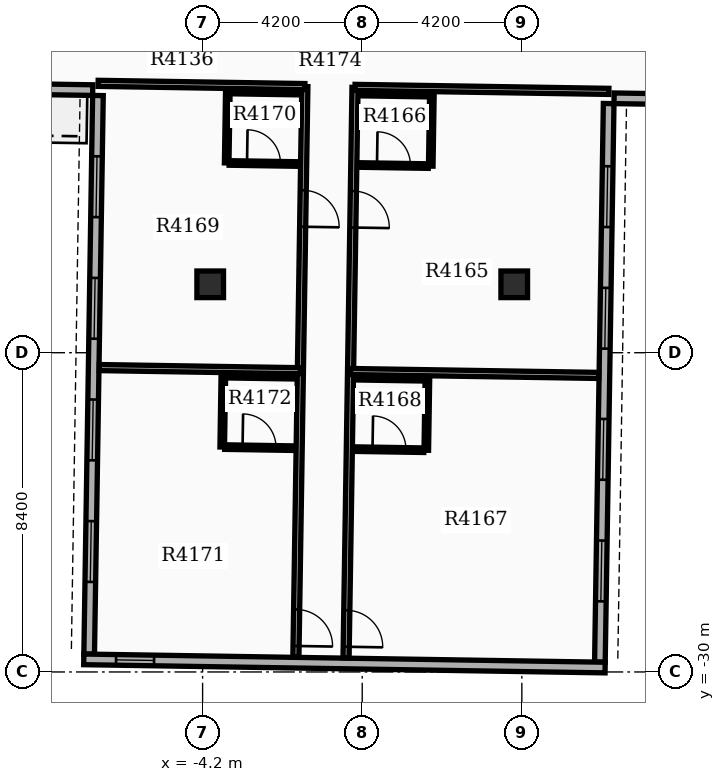
"""IFC4 building model, lengths in metres.
Left out: names, types, materials, properties, quantities, classifications, styles, units other than length and angle.
Written with IfcOpenShell. Run it as: python <this file> out.ifc"""

import sys

from ifc_helpers import new_model, si_unit, direction, frame, frame_2d, origin, origin_2d, place, context, subcontext, project, spatial, rectangle, extrude, element, fill, save


model = new_model("IFC4")
c1 = context("Model", 3, precision=1e-05, world=origin(), true_north=direction((0.0, 1.0)))
c2 = subcontext(c1, "Body", "Model", "MODEL_VIEW")
j1 = project(units=[si_unit("LENGTHUNIT", "METRE"), si_unit("PLANEANGLEUNIT", "RADIAN")], contexts=[c1])
p1 = place(None, origin())
s1 = spatial("IfcSite", under=j1, at=p1, CompositionType="ELEMENT")
p2 = place(p1, origin())
s2 = spatial("IfcBuilding", under=s1, at=p2, CompositionType="ELEMENT")
p3 = place(p2, frame((0.0, 0.0, 261.6)))
s3 = spatial("IfcBuildingStorey", under=s2, at=p3, CompositionType="ELEMENT", Elevation=261.6)
for number, where, z_axis, x_axis in (
    (1, (-4.0, -19.8, 0.0), (0.0, 0.0, 1.0), (1.0, 0.0, 0.0)),
    (2, (4.0, -19.8, 0.0), (0.0, 0.0, 1.0), (1.0, 0.0, 0.0)),
):
    element("IfcColumn", number, at=place(p3, frame(where, z_axis=z_axis, x_axis=x_axis)), inside=s3, PredefinedType="COLUMN", context=c2, shape_type="SweptSolid", body=[
        extrude(rectangle(XDim=0.7, YDim=0.7, at=origin_2d()), origin(), (0.0, 0.0, 1.0), 3.9),
    ])
p4 = place(p3, frame((-6.954, -14.833, 0.0), z_axis=(0.0, 0.0, 1.0), x_axis=(-0.015711302158, -0.999876569875, 0.0)))
e3 = element("IfcWall", 3, at=p4, inside=s3, PredefinedType="STANDARD", context=c2, shape_type="SweptSolid", body=[
    extrude(rectangle(XDim=14.7, YDim=0.28, at=frame_2d((7.35, 0.0))), origin(), (0.0, 0.0, 1.0), 3.18),
])
p5 = place(p4, frame((1.6, 0.0, 0.8)))
e4 = element("IfcOpeningElement", 4, at=p5, cuts=e3, PredefinedType="OPENING", context=c2, shape_type="SweptSolid", body=[
    extrude(rectangle(XDim=1.6, YDim=1.7, at=frame_2d((0.8, 0.85))), frame((0.0, 0.15, 0.0), z_axis=(0.0, -1.0, 0.0), x_axis=(1.0, 0.0, 0.0)), (0.0, 0.0, 1.0), 0.3),
])
p6 = place(p4, frame((4.8, 0.0, 0.8)))
e5 = element("IfcOpeningElement", 5, at=p6, cuts=e3, PredefinedType="OPENING", context=c2, shape_type="SweptSolid", body=[
    extrude(rectangle(XDim=1.6, YDim=1.7, at=frame_2d((0.8, 0.85))), frame((0.0, 0.15, 0.0), z_axis=(0.0, -1.0, 0.0), x_axis=(1.0, 0.0, 0.0)), (0.0, 0.0, 1.0), 0.3),
])
p7 = place(p4, frame((8.0, 0.0, 0.8)))
e6 = element("IfcOpeningElement", 6, at=p7, cuts=e3, PredefinedType="OPENING", context=c2, shape_type="SweptSolid", body=[
    extrude(rectangle(XDim=1.6, YDim=1.7, at=frame_2d((0.8, 0.85))), frame((0.0, 0.15, 0.0), z_axis=(0.0, -1.0, 0.0), x_axis=(1.0, 0.0, 0.0)), (0.0, 0.0, 1.0), 0.3),
])
p8 = place(p4, frame((11.2, 0.0, 0.8)))
e7 = element("IfcOpeningElement", 7, at=p8, cuts=e3, PredefinedType="OPENING", context=c2, shape_type="SweptSolid", body=[
    extrude(rectangle(XDim=1.6, YDim=1.7, at=frame_2d((0.8, 0.85))), frame((0.0, 0.15, 0.0), z_axis=(0.0, -1.0, 0.0), x_axis=(1.0, 0.0, 0.0)), (0.0, 0.0, 1.0), 0.3),
])
p9 = place(p3, frame((6.254, -29.742, 0.0), z_axis=(0.0, 0.0, 1.0), x_axis=(0.015711302158, 0.999876569875, 0.0)))
e8 = element("IfcWall", 8, at=p9, inside=s3, PredefinedType="STANDARD", context=c2, shape_type="SweptSolid", body=[
    extrude(rectangle(XDim=14.7, YDim=0.28, at=frame_2d((7.35, 0.0))), origin(), (0.0, 0.0, 1.0), 3.18),
])
p10 = place(p9, frame((1.6, 0.0, 0.8)))
e9 = element("IfcOpeningElement", 9, at=p10, cuts=e8, PredefinedType="OPENING", context=c2, shape_type="SweptSolid", body=[
    extrude(rectangle(XDim=1.6, YDim=1.7, at=frame_2d((0.8, 0.85))), frame((0.0, 0.15, 0.0), z_axis=(0.0, -1.0, 0.0), x_axis=(1.0, 0.0, 0.0)), (0.0, 0.0, 1.0), 0.3),
])
p11 = place(p9, frame((4.8, 0.0, 0.8)))
e10 = element("IfcOpeningElement", 10, at=p11, cuts=e8, PredefinedType="OPENING", context=c2, shape_type="SweptSolid", body=[
    extrude(rectangle(XDim=1.6, YDim=1.7, at=frame_2d((0.8, 0.85))), frame((0.0, 0.15, 0.0), z_axis=(0.0, -1.0, 0.0), x_axis=(1.0, 0.0, 0.0)), (0.0, 0.0, 1.0), 0.3),
])
p12 = place(p9, frame((8.25, 0.0, 0.8)))
e11 = element("IfcOpeningElement", 11, at=p12, cuts=e8, PredefinedType="OPENING", context=c2, shape_type="SweptSolid", body=[
    extrude(rectangle(XDim=1.6, YDim=1.7, at=frame_2d((0.8, 0.85))), frame((0.0, 0.15, 0.0), z_axis=(0.0, -1.0, 0.0), x_axis=(1.0, 0.0, 0.0)), (0.0, 0.0, 1.0), 0.3),
])
p13 = place(p9, frame((11.45, 0.0, 0.8)))
e12 = element("IfcOpeningElement", 12, at=p13, cuts=e8, PredefinedType="OPENING", context=c2, shape_type="SweptSolid", body=[
    extrude(rectangle(XDim=1.6, YDim=1.7, at=frame_2d((0.8, 0.85))), frame((0.0, 0.15, 0.0), z_axis=(0.0, -1.0, 0.0), x_axis=(1.0, 0.0, 0.0)), (0.0, 0.0, 1.0), 0.3),
])
p14 = place(p3, frame((-7.327, -29.669, 0.0), z_axis=(0.0, 0.0, 1.0), x_axis=(0.999876828887, -0.015694809807, 0.0)))
e13 = element("IfcWall", 13, at=p14, inside=s3, PredefinedType="STANDARD", context=c2, shape_type="SweptSolid", body=[
    extrude(rectangle(XDim=13.72, YDim=0.28, at=frame_2d((6.86, 0.0))), origin(), (0.0, 0.0, 1.0), 3.18),
])
p15 = place(p14, frame((0.85, 0.0, 0.85)))
e14 = element("IfcOpeningElement", 14, at=p15, cuts=e13, PredefinedType="OPENING", context=c2, shape_type="SweptSolid", body=[
    extrude(rectangle(XDim=1.0, YDim=1.5, at=frame_2d((0.5, 0.75))), frame((0.0, 0.15, 0.0), z_axis=(0.0, -1.0, 0.0), x_axis=(1.0, 0.0, 0.0)), (0.0, 0.0, 1.0), 0.3),
])
p16 = place(p3, frame((-13.391, -14.592, 0.0), z_axis=(0.0, 0.0, 1.0), x_axis=(0.999876833368, -0.015694524359, 0.0)))
e15 = element("IfcWall", 15, at=p16, inside=s3, PredefinedType="STANDARD", context=c2, shape_type="SweptSolid", body=[
    extrude(rectangle(XDim=6.3, YDim=0.28, at=frame_2d((3.15, 0.0))), origin(), (0.0, 0.0, 1.0), 3.18),
])
p17 = place(p3, frame((12.926, -15.005, 0.0), z_axis=(0.0, 0.0, 1.0), x_axis=(-0.999876823822, 0.015695132501, 0.0)))
e16 = element("IfcWall", 16, at=p17, inside=s3, PredefinedType="STANDARD", context=c2, shape_type="SweptSolid", body=[
    extrude(rectangle(XDim=6.3, YDim=0.28, at=frame_2d((3.15, 0.0))), origin(), (0.0, 0.0, 1.0), 3.18),
])
p18 = place(p3, frame((-0.19, -14.619, 0.0), z_axis=(0.0, 0.0, 1.0), x_axis=(-0.015710232149, -0.999876586687, 0.0)))
e17 = element("IfcWall", 17, at=p18, inside=s3, PredefinedType="PARTITIONING", context=c2, shape_type="SweptSolid", body=[
    extrude(rectangle(XDim=15.012, YDim=0.16, at=frame_2d((7.506, 0.0))), origin(), (0.0, 0.0, 1.0), 3.17),
])
p19 = place(p18, frame((2.728, 0.0, 0.0)))
e18 = element("IfcOpeningElement", 18, at=p19, cuts=e17, PredefinedType="OPENING", context=c2, shape_type="SweptSolid", body=[
    extrude(rectangle(XDim=0.96, YDim=2.15, at=frame_2d((0.48, 1.075))), frame((0.0, 0.09, 0.0), z_axis=(0.0, -1.0, 0.0), x_axis=(1.0, 0.0, 0.0)), (0.0, 0.0, 1.0), 0.18),
])
p20 = place(p18, frame((13.76, 0.0, 0.0)))
e19 = element("IfcOpeningElement", 19, at=p20, cuts=e17, PredefinedType="OPENING", context=c2, shape_type="SweptSolid", body=[
    extrude(rectangle(XDim=0.96, YDim=2.15, at=frame_2d((0.48, 1.075))), frame((0.0, 0.09, 0.0), z_axis=(0.0, -1.0, 0.0), x_axis=(1.0, 0.0, 0.0)), (0.0, 0.0, 1.0), 0.18),
])
p21 = place(p3, frame((-0.19, -14.619, 0.0), z_axis=(0.0, 0.0, 1.0), x_axis=(0.999877076246, -0.015679043267, 0.0)))
e20 = element("IfcWall", 20, at=p21, inside=s3, PredefinedType="PARTITIONING", context=c2, shape_type="SweptSolid", body=[
    extrude(rectangle(XDim=6.68, YDim=0.16, at=frame_2d((3.34, 0.0))), origin(), (0.0, 0.0, 1.0), 3.17),
])
p22 = place(p3, frame((-0.307, -22.095, 0.0), z_axis=(0.0, 0.0, 1.0), x_axis=(0.999876781534, -0.015697826265, 0.0)))
e21 = element("IfcWall", 21, at=p22, inside=s3, PredefinedType="PARTITIONING", context=c2, shape_type="SweptSolid", body=[
    extrude(rectangle(XDim=6.532, YDim=0.16, at=frame_2d((3.266, 0.0))), origin(), (0.0, 0.0, 1.0), 3.17),
])
p23 = place(p3, frame((-0.082, -16.661, 0.0), z_axis=(0.0, 0.0, 1.0), x_axis=(0.999876836305, -0.015694337248, 0.0)))
e22 = element("IfcWall", 22, at=p23, inside=s3, PredefinedType="PARTITIONING", context=c2, shape_type="SweptSolid", body=[
    extrude(rectangle(XDim=1.82, YDim=0.12, at=frame_2d((0.91, 0.0))), origin(), (0.0, 0.0, 1.0), 3.17),
])
p24 = place(p23, frame((0.47, 0.0, 0.0)))
e23 = element("IfcOpeningElement", 23, at=p24, cuts=e22, PredefinedType="OPENING", context=c2, shape_type="SweptSolid", body=[
    extrude(rectangle(XDim=0.88, YDim=2.1, at=frame_2d((0.44, 1.05))), frame((0.0, 0.07, 0.0), z_axis=(0.0, -1.0, 0.0), x_axis=(1.0, 0.0, 0.0)), (0.0, 0.0, 1.0), 0.14),
])
p25 = place(p3, frame((-0.052, -14.781, 0.0), z_axis=(0.0, 0.0, 1.0), x_axis=(0.999876836305, -0.015694337248, 0.0)))
e24 = element("IfcWall", 24, at=p25, inside=s3, PredefinedType="PARTITIONING", context=c2, shape_type="SweptSolid", body=[
    extrude(rectangle(XDim=1.82, YDim=0.12, at=frame_2d((0.91, 0.0))), origin(), (0.0, 0.0, 1.0), 3.17),
])
p26 = place(p3, frame((1.833, -14.811, 0.0), z_axis=(0.0, 0.0, 1.0), x_axis=(-0.01571234584, -0.999876553475, 0.0)))
e25 = element("IfcWall", 25, at=p26, inside=s3, PredefinedType="PARTITIONING", context=c2, shape_type="SweptSolid", body=[
    extrude(rectangle(XDim=1.88, YDim=0.12, at=frame_2d((0.94, 0.0))), origin(), (0.0, 0.0, 1.0), 3.17),
])
p27 = place(p3, frame((-0.199, -24.137, 0.0), z_axis=(0.0, 0.0, 1.0), x_axis=(0.999876836305, -0.015694337248, 0.0)))
e26 = element("IfcWall", 26, at=p27, inside=s3, PredefinedType="PARTITIONING", context=c2, shape_type="SweptSolid", body=[
    extrude(rectangle(XDim=1.82, YDim=0.12, at=frame_2d((0.91, 0.0))), origin(), (0.0, 0.0, 1.0), 3.17),
])
p28 = place(p27, frame((0.47, 0.0, 0.0)))
e27 = element("IfcOpeningElement", 27, at=p28, cuts=e26, PredefinedType="OPENING", context=c2, shape_type="SweptSolid", body=[
    extrude(rectangle(XDim=0.88, YDim=2.1, at=frame_2d((0.44, 1.05))), frame((0.0, 0.07, 0.0), z_axis=(0.0, -1.0, 0.0), x_axis=(1.0, 0.0, 0.0)), (0.0, 0.0, 1.0), 0.14),
])
p29 = place(p3, frame((-0.17, -22.257, 0.0), z_axis=(0.0, 0.0, 1.0), x_axis=(0.999876836305, -0.015694337248, 0.0)))
e28 = element("IfcWall", 28, at=p29, inside=s3, PredefinedType="PARTITIONING", context=c2, shape_type="SweptSolid", body=[
    extrude(rectangle(XDim=1.82, YDim=0.12, at=frame_2d((0.91, 0.0))), origin(), (0.0, 0.0, 1.0), 3.17),
])
p30 = place(p3, frame((1.715, -22.287, 0.0), z_axis=(0.0, 0.0, 1.0), x_axis=(-0.01571234584, -0.999876553475, 0.0)))
e29 = element("IfcWall", 29, at=p30, inside=s3, PredefinedType="PARTITIONING", context=c2, shape_type="SweptSolid", body=[
    extrude(rectangle(XDim=1.88, YDim=0.12, at=frame_2d((0.94, 0.0))), origin(), (0.0, 0.0, 1.0), 3.17),
])
p31 = place(p3, frame((-1.51, -14.598, 0.0), z_axis=(0.0, 0.0, 1.0), x_axis=(-0.015709976686, -0.999876590701, 0.0)))
e30 = element("IfcWall", 30, at=p31, inside=s3, PredefinedType="PARTITIONING", context=c2, shape_type="SweptSolid", body=[
    extrude(rectangle(XDim=15.012, YDim=0.16, at=frame_2d((7.506, 0.0))), origin(), (0.0, 0.0, 1.0), 3.17),
])
p32 = place(p31, frame((2.728, 0.0, 0.0)))
e31 = element("IfcOpeningElement", 31, at=p32, cuts=e30, PredefinedType="OPENING", context=c2, shape_type="SweptSolid", body=[
    extrude(rectangle(XDim=0.96, YDim=2.15, at=frame_2d((0.48, 1.075))), frame((0.0, 0.09, 0.0), z_axis=(0.0, -1.0, 0.0), x_axis=(1.0, 0.0, 0.0)), (0.0, 0.0, 1.0), 0.18),
])
p33 = place(p31, frame((13.76, 0.0, 0.0)))
e32 = element("IfcOpeningElement", 32, at=p33, cuts=e30, PredefinedType="OPENING", context=c2, shape_type="SweptSolid", body=[
    extrude(rectangle(XDim=0.96, YDim=2.15, at=frame_2d((0.48, 1.075))), frame((0.0, 0.09, 0.0), z_axis=(0.0, -1.0, 0.0), x_axis=(1.0, 0.0, 0.0)), (0.0, 0.0, 1.0), 0.18),
])
p34 = place(p3, frame((-1.51, -14.598, 0.0), z_axis=(0.0, 0.0, 1.0), x_axis=(-0.999876622965, 0.015707923068, 0.0)))
e33 = element("IfcWall", 33, at=p34, inside=s3, PredefinedType="PARTITIONING", context=c2, shape_type="SweptSolid", body=[
    extrude(rectangle(XDim=5.44, YDim=0.16, at=frame_2d((2.72, 0.0))), origin(), (0.0, 0.0, 1.0), 3.17),
])
p35 = place(p3, frame((-1.627, -22.074, 0.0), z_axis=(0.0, 0.0, 1.0), x_axis=(-0.999876245763, 0.015731915277, 0.0)))
e34 = element("IfcWall", 34, at=p35, inside=s3, PredefinedType="PARTITIONING", context=c2, shape_type="SweptSolid", body=[
    extrude(rectangle(XDim=5.292, YDim=0.16, at=frame_2d((2.646, 0.0))), origin(), (0.0, 0.0, 1.0), 3.17),
])
p36 = place(p3, frame((-3.501, -16.607, 0.0), z_axis=(0.0, 0.0, 1.0), x_axis=(0.999878932289, -0.015560230231, 0.0)))
e35 = element("IfcWall", 35, at=p36, inside=s3, PredefinedType="PARTITIONING", context=c2, shape_type="SweptSolid", body=[
    extrude(rectangle(XDim=1.82, YDim=0.12, at=frame_2d((0.91, 0.0))), origin(), (0.0, 0.0, 1.0), 3.17),
])
p37 = place(p36, frame((0.47, 0.0, 0.0)))
e36 = element("IfcOpeningElement", 36, at=p37, cuts=e35, PredefinedType="OPENING", context=c2, shape_type="SweptSolid", body=[
    extrude(rectangle(XDim=0.88, YDim=2.1, at=frame_2d((0.44, 1.05))), frame((0.0, 0.07, 0.0), z_axis=(0.0, -1.0, 0.0), x_axis=(1.0, 0.0, 0.0)), (0.0, 0.0, 1.0), 0.14),
])
p38 = place(p3, frame((-3.472, -14.727, 0.0), z_axis=(0.0, 0.0, 1.0), x_axis=(0.999876803258, -0.015696442504, 0.0)))
e37 = element("IfcWall", 37, at=p38, inside=s3, PredefinedType="PARTITIONING", context=c2, shape_type="SweptSolid", body=[
    extrude(rectangle(XDim=1.82, YDim=0.12, at=frame_2d((0.91, 0.0))), origin(), (0.0, 0.0, 1.0), 3.17),
])
p39 = place(p3, frame((-3.537, -14.726, 0.0), z_axis=(0.0, 0.0, 1.0), x_axis=(-0.015844224657, -0.999874472394, 0.0)))
e38 = element("IfcWall", 38, at=p39, inside=s3, PredefinedType="PARTITIONING", context=c2, shape_type="SweptSolid", body=[
    extrude(rectangle(XDim=1.88, YDim=0.12, at=frame_2d((0.94, 0.0))), origin(), (0.0, 0.0, 1.0), 3.17),
])
p40 = place(p3, frame((-3.619, -24.083, 0.0), z_axis=(0.0, 0.0, 1.0), x_axis=(0.999874688728, -0.015830566654, 0.0)))
e39 = element("IfcWall", 39, at=p40, inside=s3, PredefinedType="PARTITIONING", context=c2, shape_type="SweptSolid", body=[
    extrude(rectangle(XDim=1.82, YDim=0.12, at=frame_2d((0.91, 0.0))), origin(), (0.0, 0.0, 1.0), 3.17),
])
p41 = place(p40, frame((0.47, 0.0, 0.0)))
e40 = element("IfcOpeningElement", 40, at=p41, cuts=e39, PredefinedType="OPENING", context=c2, shape_type="SweptSolid", body=[
    extrude(rectangle(XDim=0.88, YDim=2.1, at=frame_2d((0.44, 1.05))), frame((0.0, 0.07, 0.0), z_axis=(0.0, -1.0, 0.0), x_axis=(1.0, 0.0, 0.0)), (0.0, 0.0, 1.0), 0.14),
])
p42 = place(p3, frame((-3.589, -22.203, 0.0), z_axis=(0.0, 0.0, 1.0), x_axis=(0.999876836305, -0.015694337248, 0.0)))
e41 = element("IfcWall", 41, at=p42, inside=s3, PredefinedType="PARTITIONING", context=c2, shape_type="SweptSolid", body=[
    extrude(rectangle(XDim=1.82, YDim=0.12, at=frame_2d((0.91, 0.0))), origin(), (0.0, 0.0, 1.0), 3.17),
])
p43 = place(p3, frame((-3.654, -22.202, 0.0), z_axis=(0.0, 0.0, 1.0), x_axis=(-0.01558454688, -0.999878553575, 0.0)))
e42 = element("IfcWall", 42, at=p43, inside=s3, PredefinedType="PARTITIONING", context=c2, shape_type="SweptSolid", body=[
    extrude(rectangle(XDim=1.88, YDim=0.12, at=frame_2d((0.94, 0.0))), origin(), (0.0, 0.0, 1.0), 3.17),
])
p44 = place(p5, origin())
e43 = element("IfcWindow", 43, at=p44, inside=s3, PartitioningType="SINGLE_PANEL", PredefinedType="WINDOW", context=c2, shape_type="SweptSolid", body=[
    extrude(rectangle(XDim=1.6, YDim=1.7, at=frame_2d((0.8, 0.85))), frame((0.0, 0.03, 0.0), z_axis=(0.0, -1.0, 0.0), x_axis=(1.0, 0.0, 0.0)), (0.0, 0.0, 1.0), 0.06),
])
fill(e4, e43)
p45 = place(p6, origin())
e44 = element("IfcWindow", 44, at=p45, inside=s3, PartitioningType="SINGLE_PANEL", PredefinedType="WINDOW", context=c2, shape_type="SweptSolid", body=[
    extrude(rectangle(XDim=1.6, YDim=1.7, at=frame_2d((0.8, 0.85))), frame((0.0, 0.03, 0.0), z_axis=(0.0, -1.0, 0.0), x_axis=(1.0, 0.0, 0.0)), (0.0, 0.0, 1.0), 0.06),
])
fill(e5, e44)
p46 = place(p7, origin())
e45 = element("IfcWindow", 45, at=p46, inside=s3, PartitioningType="SINGLE_PANEL", PredefinedType="WINDOW", context=c2, shape_type="SweptSolid", body=[
    extrude(rectangle(XDim=1.6, YDim=1.7, at=frame_2d((0.8, 0.85))), frame((0.0, 0.03, 0.0), z_axis=(0.0, -1.0, 0.0), x_axis=(1.0, 0.0, 0.0)), (0.0, 0.0, 1.0), 0.06),
])
fill(e6, e45)
p47 = place(p8, origin())
e46 = element("IfcWindow", 46, at=p47, inside=s3, PartitioningType="SINGLE_PANEL", PredefinedType="WINDOW", context=c2, shape_type="SweptSolid", body=[
    extrude(rectangle(XDim=1.6, YDim=1.7, at=frame_2d((0.8, 0.85))), frame((0.0, 0.03, 0.0), z_axis=(0.0, -1.0, 0.0), x_axis=(1.0, 0.0, 0.0)), (0.0, 0.0, 1.0), 0.06),
])
fill(e7, e46)
p48 = place(p10, origin())
e47 = element("IfcWindow", 47, at=p48, inside=s3, PartitioningType="SINGLE_PANEL", PredefinedType="WINDOW", context=c2, shape_type="SweptSolid", body=[
    extrude(rectangle(XDim=1.6, YDim=1.7, at=frame_2d((0.8, 0.85))), frame((0.0, 0.03, 0.0), z_axis=(0.0, -1.0, 0.0), x_axis=(1.0, 0.0, 0.0)), (0.0, 0.0, 1.0), 0.06),
])
fill(e9, e47)
p49 = place(p11, origin())
e48 = element("IfcWindow", 48, at=p49, inside=s3, PartitioningType="SINGLE_PANEL", PredefinedType="WINDOW", context=c2, shape_type="SweptSolid", body=[
    extrude(rectangle(XDim=1.6, YDim=1.7, at=frame_2d((0.8, 0.85))), frame((0.0, 0.03, 0.0), z_axis=(0.0, -1.0, 0.0), x_axis=(1.0, 0.0, 0.0)), (0.0, 0.0, 1.0), 0.06),
])
fill(e10, e48)
p50 = place(p12, origin())
e49 = element("IfcWindow", 49, at=p50, inside=s3, PartitioningType="SINGLE_PANEL", PredefinedType="WINDOW", context=c2, shape_type="SweptSolid", body=[
    extrude(rectangle(XDim=1.6, YDim=1.7, at=frame_2d((0.8, 0.85))), frame((0.0, 0.03, 0.0), z_axis=(0.0, -1.0, 0.0), x_axis=(1.0, 0.0, 0.0)), (0.0, 0.0, 1.0), 0.06),
])
fill(e11, e49)
p51 = place(p13, origin())
e50 = element("IfcWindow", 50, at=p51, inside=s3, PartitioningType="SINGLE_PANEL", PredefinedType="WINDOW", context=c2, shape_type="SweptSolid", body=[
    extrude(rectangle(XDim=1.6, YDim=1.7, at=frame_2d((0.8, 0.85))), frame((0.0, 0.03, 0.0), z_axis=(0.0, -1.0, 0.0), x_axis=(1.0, 0.0, 0.0)), (0.0, 0.0, 1.0), 0.06),
])
fill(e12, e50)
p52 = place(p15, origin())
e51 = element("IfcWindow", 51, at=p52, inside=s3, PartitioningType="SINGLE_PANEL", PredefinedType="WINDOW", context=c2, shape_type="SweptSolid", body=[
    extrude(rectangle(XDim=1.0, YDim=1.5, at=frame_2d((0.5, 0.75))), frame((0.0, 0.03, 0.0), z_axis=(0.0, -1.0, 0.0), x_axis=(1.0, 0.0, 0.0)), (0.0, 0.0, 1.0), 0.06),
])
fill(e14, e51)
p53 = place(p19, origin())
e52 = element("IfcDoor", 52, at=p53, inside=s3, OperationType="SINGLE_SWING_RIGHT", PredefinedType="DOOR", context=c2, shape_type="SweptSolid", body=[
    extrude(rectangle(XDim=0.96, YDim=2.15, at=frame_2d((0.48, 1.075))), frame((0.0, 0.025, 0.0), z_axis=(0.0, -1.0, 0.0), x_axis=(1.0, 0.0, 0.0)), (0.0, 0.0, 1.0), 0.05),
])
fill(e18, e52)
p54 = place(p24, origin())
e53 = element("IfcDoor", 53, at=p54, inside=s3, OperationType="SINGLE_SWING_LEFT", PredefinedType="DOOR", context=c2, shape_type="SweptSolid", body=[
    extrude(rectangle(XDim=0.88, YDim=2.1, at=frame_2d((0.44, 1.05))), frame((0.0, 0.025, 0.0), z_axis=(0.0, -1.0, 0.0), x_axis=(1.0, 0.0, 0.0)), (0.0, 0.0, 1.0), 0.05),
])
fill(e23, e53)
p55 = place(p20, origin())
e54 = element("IfcDoor", 54, at=p55, inside=s3, OperationType="SINGLE_SWING_RIGHT", PredefinedType="DOOR", context=c2, shape_type="SweptSolid", body=[
    extrude(rectangle(XDim=0.96, YDim=2.15, at=frame_2d((0.48, 1.075))), frame((0.0, 0.025, 0.0), z_axis=(0.0, -1.0, 0.0), x_axis=(1.0, 0.0, 0.0)), (0.0, 0.0, 1.0), 0.05),
])
fill(e19, e54)
p56 = place(p28, origin())
e55 = element("IfcDoor", 55, at=p56, inside=s3, OperationType="SINGLE_SWING_LEFT", PredefinedType="DOOR", context=c2, shape_type="SweptSolid", body=[
    extrude(rectangle(XDim=0.88, YDim=2.1, at=frame_2d((0.44, 1.05))), frame((0.0, 0.025, 0.0), z_axis=(0.0, -1.0, 0.0), x_axis=(1.0, 0.0, 0.0)), (0.0, 0.0, 1.0), 0.05),
])
fill(e27, e55)
p57 = place(p32, origin())
e56 = element("IfcDoor", 56, at=p57, inside=s3, OperationType="SINGLE_SWING_RIGHT", PredefinedType="DOOR", context=c2, shape_type="SweptSolid", body=[
    extrude(rectangle(XDim=0.96, YDim=2.15, at=frame_2d((0.48, 1.075))), frame((0.0, 0.025, 0.0), z_axis=(0.0, -1.0, 0.0), x_axis=(1.0, 0.0, 0.0)), (0.0, 0.0, 1.0), 0.05),
])
fill(e31, e56)
p58 = place(p37, origin())
e57 = element("IfcDoor", 57, at=p58, inside=s3, OperationType="SINGLE_SWING_LEFT", PredefinedType="DOOR", context=c2, shape_type="SweptSolid", body=[
    extrude(rectangle(XDim=0.88, YDim=2.1, at=frame_2d((0.44, 1.05))), frame((0.0, 0.025, 0.0), z_axis=(0.0, -1.0, 0.0), x_axis=(1.0, 0.0, 0.0)), (0.0, 0.0, 1.0), 0.05),
])
fill(e36, e57)
p59 = place(p33, origin())
e58 = element("IfcDoor", 58, at=p59, inside=s3, OperationType="SINGLE_SWING_RIGHT", PredefinedType="DOOR", context=c2, shape_type="SweptSolid", body=[
    extrude(rectangle(XDim=0.96, YDim=2.15, at=frame_2d((0.48, 1.075))), frame((0.0, 0.025, 0.0), z_axis=(0.0, -1.0, 0.0), x_axis=(1.0, 0.0, 0.0)), (0.0, 0.0, 1.0), 0.05),
])
fill(e32, e58)
p60 = place(p41, origin())
e59 = element("IfcDoor", 59, at=p60, inside=s3, OperationType="SINGLE_SWING_LEFT", PredefinedType="DOOR", context=c2, shape_type="SweptSolid", body=[
    extrude(rectangle(XDim=0.88, YDim=2.1, at=frame_2d((0.44, 1.05))), frame((0.0, 0.025, 0.0), z_axis=(0.0, -1.0, 0.0), x_axis=(1.0, 0.0, 0.0)), (0.0, 0.0, 1.0), 0.05),
])
fill(e40, e59)
save(model, sys.argv[1])
